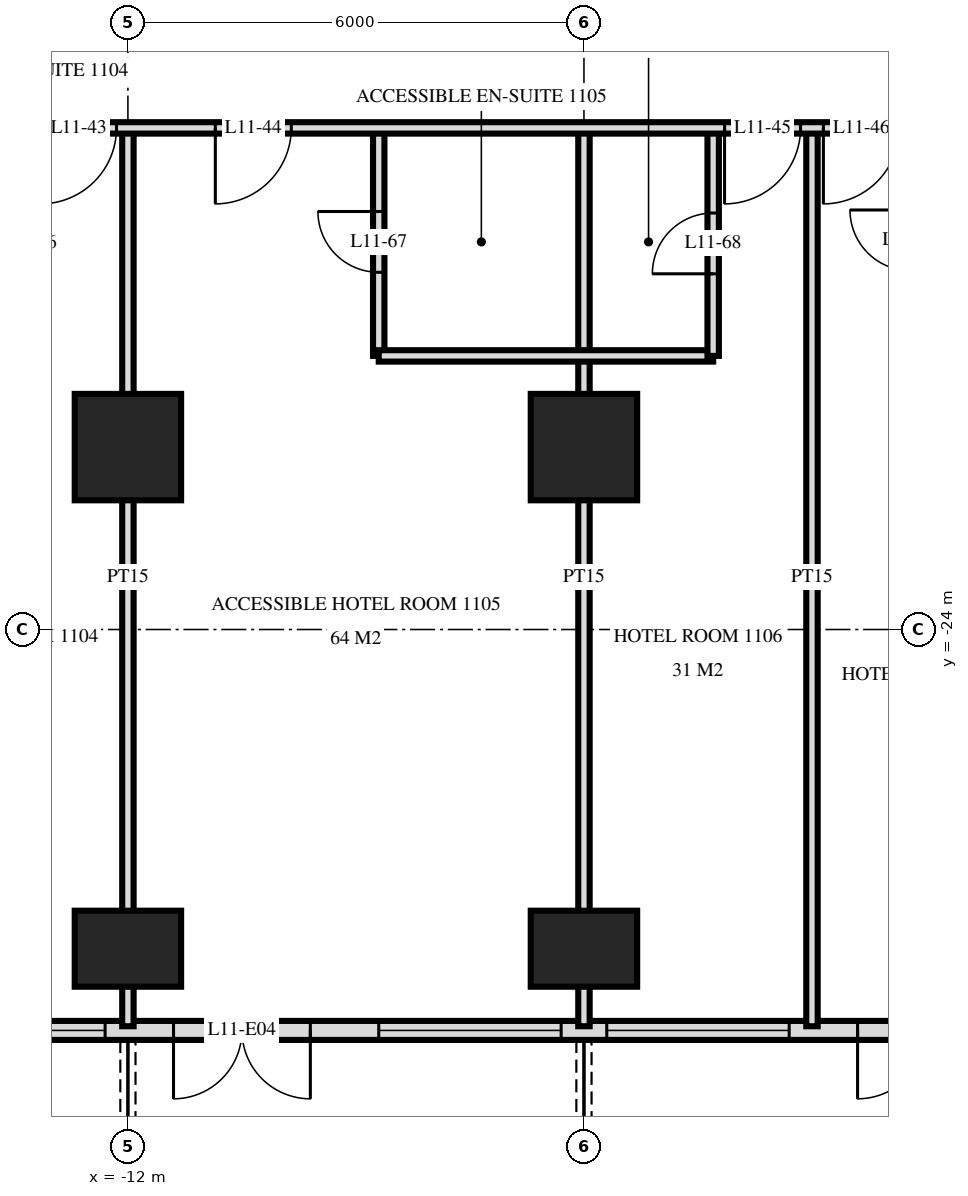
"""IFC4 building model, lengths in metres.
Left out: names, types, materials, properties, quantities, classifications, styles, units other than length and angle.
Written with IfcOpenShell. Run it as: python <this file> out.ifc"""

import sys

from ifc_helpers import new_model, si_unit, direction, frame, frame_2d, origin, origin_2d, place, context, subcontext, project, spatial, rectangle, extrude, element, fill, save


model = new_model("IFC4")
c1 = context("Model", 3, precision=1e-05, world=origin(), true_north=direction((0.0, 1.0)))
c2 = subcontext(c1, "Body", "Model", "MODEL_VIEW")
j1 = project(units=[si_unit("LENGTHUNIT", "METRE"), si_unit("PLANEANGLEUNIT", "RADIAN")], contexts=[c1])
p1 = place(None, origin())
s1 = spatial("IfcSite", under=j1, at=p1, CompositionType="ELEMENT")
p2 = place(p1, origin())
s2 = spatial("IfcBuilding", under=s1, at=p2, CompositionType="ELEMENT")
p3 = place(p2, frame((0.0, 0.0, 49.2)))
s3 = spatial("IfcBuildingStorey", under=s2, at=p3, CompositionType="ELEMENT", Elevation=49.2)
p4 = place(p3, frame((-12.0, -28.2, 0.0), z_axis=(0.0, 0.0, 1.0), x_axis=(1.0, 0.0, 0.0)))
e1 = element("IfcColumn", 1, at=p4, inside=s3, PredefinedType="COLUMN", context=c2, shape_type="SweptSolid", body=[
    extrude(rectangle(XDim=1.4, YDim=1.0, at=origin_2d()), origin(), (0.0, 0.0, 1.0), 3.6),
])
p5 = place(p3, frame((-12.0, -21.6, 0.0), z_axis=(0.0, 0.0, 1.0), x_axis=(1.0, 0.0, 0.0)))
e2 = element("IfcColumn", 2, at=p5, inside=s3, PredefinedType="COLUMN", context=c2, shape_type="SweptSolid", body=[
    extrude(rectangle(XDim=1.4, YDim=1.4, at=origin_2d()), origin(), (0.0, 0.0, 1.0), 3.6),
])
p6 = place(p3, frame((-6.0, -28.2, 0.0), z_axis=(0.0, 0.0, 1.0), x_axis=(1.0, 0.0, 0.0)))
e3 = element("IfcColumn", 3, at=p6, inside=s3, PredefinedType="COLUMN", context=c2, shape_type="SweptSolid", body=[
    extrude(rectangle(XDim=1.4, YDim=1.0, at=origin_2d()), origin(), (0.0, 0.0, 1.0), 3.6),
])
p7 = place(p3, frame((-6.0, -21.6, 0.0), z_axis=(0.0, 0.0, 1.0), x_axis=(1.0, 0.0, 0.0)))
e4 = element("IfcColumn", 4, at=p7, inside=s3, PredefinedType="COLUMN", context=c2, shape_type="SweptSolid", body=[
    extrude(rectangle(XDim=1.4, YDim=1.4, at=origin_2d()), origin(), (0.0, 0.0, 1.0), 3.6),
])
p8 = place(p3, frame((-28.775, -29.275, 0.0), z_axis=(0.0, 0.0, 1.0), x_axis=(1.0, 0.0, 0.0)))
e5 = element("IfcWall", 5, at=p8, inside=s3, PredefinedType="SOLIDWALL", context=c2, shape_type="SweptSolid", body=[
    extrude(rectangle(XDim=57.551, YDim=0.25, at=frame_2d((28.775, 0.0))), origin(), (0.0, 0.0, 1.0), 3.32),
])
p9 = place(p8, frame((0.575, 0.0, 0.0)))
e6 = element("IfcOpeningElement", 6, at=p9, cuts=e5, PredefinedType="OPENING", context=c2, shape_type="SweptSolid", body=[
    extrude(rectangle(XDim=1.8, YDim=2.4, at=frame_2d((0.9, 1.2))), frame((0.0, 0.135, 0.0), z_axis=(0.0, -1.0, 0.0), x_axis=(1.0, 0.0, 0.0)), (0.0, 0.0, 1.0), 0.27),
])
p10 = place(p8, frame((5.375, 0.0, 0.0)))
e7 = element("IfcOpeningElement", 7, at=p10, cuts=e5, PredefinedType="OPENING", context=c2, shape_type="SweptSolid", body=[
    extrude(rectangle(XDim=1.8, YDim=2.4, at=frame_2d((0.9, 1.2))), frame((0.0, 0.135, 0.0), z_axis=(0.0, -1.0, 0.0), x_axis=(1.0, 0.0, 0.0)), (0.0, 0.0, 1.0), 0.27),
])
p11 = place(p8, frame((8.075, 0.0, 0.3)))
e8 = element("IfcOpeningElement", 8, at=p11, cuts=e5, PredefinedType="OPENING", context=c2, shape_type="SweptSolid", body=[
    extrude(rectangle(XDim=2.4, YDim=2.1, at=frame_2d((1.2, 1.05))), frame((0.0, 0.135, 0.0), z_axis=(0.0, -1.0, 0.0), x_axis=(1.0, 0.0, 0.0)), (0.0, 0.0, 1.0), 0.27),
])
p12 = place(p8, frame((11.375, 0.0, 0.0)))
e9 = element("IfcOpeningElement", 9, at=p12, cuts=e5, PredefinedType="OPENING", context=c2, shape_type="SweptSolid", body=[
    extrude(rectangle(XDim=1.8, YDim=2.4, at=frame_2d((0.9, 1.2))), frame((0.0, 0.135, 0.0), z_axis=(0.0, -1.0, 0.0), x_axis=(1.0, 0.0, 0.0)), (0.0, 0.0, 1.0), 0.27),
])
p13 = place(p8, frame((14.075, 0.0, 0.3)))
e10 = element("IfcOpeningElement", 10, at=p13, cuts=e5, PredefinedType="OPENING", context=c2, shape_type="SweptSolid", body=[
    extrude(rectangle(XDim=2.4, YDim=2.1, at=frame_2d((1.2, 1.05))), frame((0.0, 0.135, 0.0), z_axis=(0.0, -1.0, 0.0), x_axis=(1.0, 0.0, 0.0)), (0.0, 0.0, 1.0), 0.27),
])
p14 = place(p8, frame((17.375, 0.0, 0.0)))
e11 = element("IfcOpeningElement", 11, at=p14, cuts=e5, PredefinedType="OPENING", context=c2, shape_type="SweptSolid", body=[
    extrude(rectangle(XDim=1.8, YDim=2.4, at=frame_2d((0.9, 1.2))), frame((0.0, 0.135, 0.0), z_axis=(0.0, -1.0, 0.0), x_axis=(1.0, 0.0, 0.0)), (0.0, 0.0, 1.0), 0.27),
])
p15 = place(p8, frame((20.075, 0.0, 0.3)))
e12 = element("IfcOpeningElement", 12, at=p15, cuts=e5, PredefinedType="OPENING", context=c2, shape_type="SweptSolid", body=[
    extrude(rectangle(XDim=2.4, YDim=2.1, at=frame_2d((1.2, 1.05))), frame((0.0, 0.135, 0.0), z_axis=(0.0, -1.0, 0.0), x_axis=(1.0, 0.0, 0.0)), (0.0, 0.0, 1.0), 0.27),
])
p16 = place(p8, frame((23.075, 0.0, 0.3)))
e13 = element("IfcOpeningElement", 13, at=p16, cuts=e5, PredefinedType="OPENING", context=c2, shape_type="SweptSolid", body=[
    extrude(rectangle(XDim=2.4, YDim=2.1, at=frame_2d((1.2, 1.05))), frame((0.0, 0.135, 0.0), z_axis=(0.0, -1.0, 0.0), x_axis=(1.0, 0.0, 0.0)), (0.0, 0.0, 1.0), 0.27),
])
p17 = place(p8, frame((26.375, 0.0, 0.0)))
e14 = element("IfcOpeningElement", 14, at=p17, cuts=e5, PredefinedType="OPENING", context=c2, shape_type="SweptSolid", body=[
    extrude(rectangle(XDim=1.8, YDim=2.4, at=frame_2d((0.9, 1.2))), frame((0.0, 0.135, 0.0), z_axis=(0.0, -1.0, 0.0), x_axis=(1.0, 0.0, 0.0)), (0.0, 0.0, 1.0), 0.27),
])
p18 = place(p8, frame((29.375, 0.0, 0.0)))
e15 = element("IfcOpeningElement", 15, at=p18, cuts=e5, PredefinedType="OPENING", context=c2, shape_type="SweptSolid", body=[
    extrude(rectangle(XDim=1.8, YDim=2.4, at=frame_2d((0.9, 1.2))), frame((0.0, 0.135, 0.0), z_axis=(0.0, -1.0, 0.0), x_axis=(1.0, 0.0, 0.0)), (0.0, 0.0, 1.0), 0.27),
])
p19 = place(p8, frame((32.075, 0.0, 0.3)))
e16 = element("IfcOpeningElement", 16, at=p19, cuts=e5, PredefinedType="OPENING", context=c2, shape_type="SweptSolid", body=[
    extrude(rectangle(XDim=2.4, YDim=2.1, at=frame_2d((1.2, 1.05))), frame((0.0, 0.135, 0.0), z_axis=(0.0, -1.0, 0.0), x_axis=(1.0, 0.0, 0.0)), (0.0, 0.0, 1.0), 0.27),
])
p20 = place(p8, frame((35.075, 0.0, 0.3)))
e17 = element("IfcOpeningElement", 17, at=p20, cuts=e5, PredefinedType="OPENING", context=c2, shape_type="SweptSolid", body=[
    extrude(rectangle(XDim=2.4, YDim=2.1, at=frame_2d((1.2, 1.05))), frame((0.0, 0.135, 0.0), z_axis=(0.0, -1.0, 0.0), x_axis=(1.0, 0.0, 0.0)), (0.0, 0.0, 1.0), 0.27),
])
p21 = place(p8, frame((38.375, 0.0, 0.0)))
e18 = element("IfcOpeningElement", 18, at=p21, cuts=e5, PredefinedType="OPENING", context=c2, shape_type="SweptSolid", body=[
    extrude(rectangle(XDim=1.8, YDim=2.4, at=frame_2d((0.9, 1.2))), frame((0.0, 0.135, 0.0), z_axis=(0.0, -1.0, 0.0), x_axis=(1.0, 0.0, 0.0)), (0.0, 0.0, 1.0), 0.27),
])
p22 = place(p8, frame((41.375, 0.0, 0.0)))
e19 = element("IfcOpeningElement", 19, at=p22, cuts=e5, PredefinedType="OPENING", context=c2, shape_type="SweptSolid", body=[
    extrude(rectangle(XDim=1.8, YDim=2.4, at=frame_2d((0.9, 1.2))), frame((0.0, 0.135, 0.0), z_axis=(0.0, -1.0, 0.0), x_axis=(1.0, 0.0, 0.0)), (0.0, 0.0, 1.0), 0.27),
])
p23 = place(p8, frame((44.075, 0.0, 0.3)))
e20 = element("IfcOpeningElement", 20, at=p23, cuts=e5, PredefinedType="OPENING", context=c2, shape_type="SweptSolid", body=[
    extrude(rectangle(XDim=2.4, YDim=2.1, at=frame_2d((1.2, 1.05))), frame((0.0, 0.135, 0.0), z_axis=(0.0, -1.0, 0.0), x_axis=(1.0, 0.0, 0.0)), (0.0, 0.0, 1.0), 0.27),
])
p24 = place(p8, frame((47.075, 0.0, 0.3)))
e21 = element("IfcOpeningElement", 21, at=p24, cuts=e5, PredefinedType="OPENING", context=c2, shape_type="SweptSolid", body=[
    extrude(rectangle(XDim=2.4, YDim=2.1, at=frame_2d((1.2, 1.05))), frame((0.0, 0.135, 0.0), z_axis=(0.0, -1.0, 0.0), x_axis=(1.0, 0.0, 0.0)), (0.0, 0.0, 1.0), 0.27),
])
p25 = place(p8, frame((50.375, 0.0, 0.0)))
e22 = element("IfcOpeningElement", 22, at=p25, cuts=e5, PredefinedType="OPENING", context=c2, shape_type="SweptSolid", body=[
    extrude(rectangle(XDim=1.8, YDim=2.4, at=frame_2d((0.9, 1.2))), frame((0.0, 0.135, 0.0), z_axis=(0.0, -1.0, 0.0), x_axis=(1.0, 0.0, 0.0)), (0.0, 0.0, 1.0), 0.27),
])
p26 = place(p8, frame((53.375, 0.0, 0.0)))
e23 = element("IfcOpeningElement", 23, at=p26, cuts=e5, PredefinedType="OPENING", context=c2, shape_type="SweptSolid", body=[
    extrude(rectangle(XDim=1.8, YDim=2.4, at=frame_2d((0.9, 1.2))), frame((0.0, 0.135, 0.0), z_axis=(0.0, -1.0, 0.0), x_axis=(1.0, 0.0, 0.0)), (0.0, 0.0, 1.0), 0.27),
])
p27 = place(p3, frame((-3.0, -29.22, 0.0), z_axis=(0.0, 0.0, 1.0), x_axis=(0.0, 1.0, 0.0)))
e24 = element("IfcWall", 24, at=p27, inside=s3, PredefinedType="PARTITIONING", context=c2, shape_type="SweptSolid", body=[
    extrude(rectangle(XDim=11.82, YDim=0.15, at=frame_2d((5.91, 0.0))), origin(), (0.0, 0.0, 1.0), 3.32),
])
p28 = place(p3, frame((-4.3, -20.4, 0.0), z_axis=(0.0, 0.0, 1.0), x_axis=(0.0, 1.0, 0.0)))
e25 = element("IfcWall", 25, at=p28, inside=s3, PredefinedType="PARTITIONING", context=c2, shape_type="SweptSolid", body=[
    extrude(rectangle(XDim=3.0, YDim=0.15, at=frame_2d((1.5, 0.0))), origin(), (0.0, 0.0, 1.0), 3.32),
])
p29 = place(p28, frame((1.08, 0.0, 0.0)))
e26 = element("IfcOpeningElement", 26, at=p29, cuts=e25, PredefinedType="OPENING", context=c2, shape_type="SweptSolid", body=[
    extrude(rectangle(XDim=0.8, YDim=2.1, at=frame_2d((0.4, 1.05))), frame((0.0, 0.085, 0.0), z_axis=(0.0, -1.0, 0.0), x_axis=(1.0, 0.0, 0.0)), (0.0, 0.0, 1.0), 0.17),
])
p30 = place(p3, frame((-6.0, -29.22, 0.0), z_axis=(0.0, 0.0, 1.0), x_axis=(0.0, 1.0, 0.0)))
e27 = element("IfcWall", 27, at=p30, inside=s3, PredefinedType="PARTITIONING", context=c2, shape_type="SweptSolid", body=[
    extrude(rectangle(XDim=11.82, YDim=0.15, at=frame_2d((5.91, 0.0))), origin(), (0.0, 0.0, 1.0), 3.32),
])
p31 = place(p3, frame((-8.7, -20.4, 0.0), z_axis=(0.0, 0.0, 1.0), x_axis=(0.0, 1.0, 0.0)))
e28 = element("IfcWall", 28, at=p31, inside=s3, PredefinedType="PARTITIONING", context=c2, shape_type="SweptSolid", body=[
    extrude(rectangle(XDim=3.0, YDim=0.15, at=frame_2d((1.5, 0.0))), origin(), (0.0, 0.0, 1.0), 3.32),
])
p32 = place(p31, frame((1.1, 0.0, 0.0)))
e29 = element("IfcOpeningElement", 29, at=p32, cuts=e28, PredefinedType="OPENING", context=c2, shape_type="SweptSolid", body=[
    extrude(rectangle(XDim=0.8, YDim=2.1, at=frame_2d((0.4, 1.05))), frame((0.0, 0.085, 0.0), z_axis=(0.0, -1.0, 0.0), x_axis=(1.0, 0.0, 0.0)), (0.0, 0.0, 1.0), 0.17),
])
p33 = place(p3, frame((-12.0, -29.22, 0.0), z_axis=(0.0, 0.0, 1.0), x_axis=(0.0, 1.0, 0.0)))
e30 = element("IfcWall", 30, at=p33, inside=s3, PredefinedType="PARTITIONING", context=c2, shape_type="SweptSolid", body=[
    extrude(rectangle(XDim=11.82, YDim=0.15, at=frame_2d((5.91, 0.0))), origin(), (0.0, 0.0, 1.0), 3.32),
])
p34 = place(p3, frame((-8.7, -20.4, 0.0), z_axis=(0.0, 0.0, 1.0), x_axis=(1.0, 0.0, 0.0)))
e31 = element("IfcWall", 31, at=p34, inside=s3, PredefinedType="PARTITIONING", context=c2, shape_type="SweptSolid", body=[
    extrude(rectangle(XDim=4.4, YDim=0.15, at=frame_2d((2.2, 0.0))), origin(), (0.0, 0.0, 1.0), 3.32),
])
p35 = place(p3, frame((-33.12, -17.4, 0.0), z_axis=(0.0, 0.0, 1.0), x_axis=(1.0, 0.0, 0.0)))
e32 = element("IfcWall", 32, at=p35, inside=s3, PredefinedType="PARTITIONING", context=c2, shape_type="SweptSolid", body=[
    extrude(rectangle(XDim=66.24, YDim=0.15, at=frame_2d((33.12, 0.0))), origin(), (0.0, 0.0, 1.0), 3.32),
])
p36 = place(p35, frame((9.27, 0.0, 0.0)))
e33 = element("IfcOpeningElement", 33, at=p36, cuts=e32, PredefinedType="OPENING", context=c2, shape_type="SweptSolid", body=[
    extrude(rectangle(XDim=1.0, YDim=2.1, at=frame_2d((0.5, 1.05))), frame((0.0, 0.085, 0.0), z_axis=(0.0, -1.0, 0.0), x_axis=(1.0, 0.0, 0.0)), (0.0, 0.0, 1.0), 0.17),
])
p37 = place(p35, frame((13.97, 0.0, 0.0)))
e34 = element("IfcOpeningElement", 34, at=p37, cuts=e32, PredefinedType="OPENING", context=c2, shape_type="SweptSolid", body=[
    extrude(rectangle(XDim=1.0, YDim=2.1, at=frame_2d((0.5, 1.05))), frame((0.0, 0.085, 0.0), z_axis=(0.0, -1.0, 0.0), x_axis=(1.0, 0.0, 0.0)), (0.0, 0.0, 1.0), 0.17),
])
p38 = place(p35, frame((15.27, 0.0, 0.0)))
e35 = element("IfcOpeningElement", 35, at=p38, cuts=e32, PredefinedType="OPENING", context=c2, shape_type="SweptSolid", body=[
    extrude(rectangle(XDim=1.0, YDim=2.1, at=frame_2d((0.5, 1.05))), frame((0.0, 0.085, 0.0), z_axis=(0.0, -1.0, 0.0), x_axis=(1.0, 0.0, 0.0)), (0.0, 0.0, 1.0), 0.17),
])
p39 = place(p35, frame((19.97, 0.0, 0.0)))
e36 = element("IfcOpeningElement", 36, at=p39, cuts=e32, PredefinedType="OPENING", context=c2, shape_type="SweptSolid", body=[
    extrude(rectangle(XDim=1.0, YDim=2.1, at=frame_2d((0.5, 1.05))), frame((0.0, 0.085, 0.0), z_axis=(0.0, -1.0, 0.0), x_axis=(1.0, 0.0, 0.0)), (0.0, 0.0, 1.0), 0.17),
])
p40 = place(p35, frame((22.27, 0.0, 0.0)))
e37 = element("IfcOpeningElement", 37, at=p40, cuts=e32, PredefinedType="OPENING", context=c2, shape_type="SweptSolid", body=[
    extrude(rectangle(XDim=1.0, YDim=2.1, at=frame_2d((0.5, 1.05))), frame((0.0, 0.085, 0.0), z_axis=(0.0, -1.0, 0.0), x_axis=(1.0, 0.0, 0.0)), (0.0, 0.0, 1.0), 0.17),
])
p41 = place(p35, frame((28.97, 0.0, 0.0)))
e38 = element("IfcOpeningElement", 38, at=p41, cuts=e32, PredefinedType="OPENING", context=c2, shape_type="SweptSolid", body=[
    extrude(rectangle(XDim=1.0, YDim=2.1, at=frame_2d((0.5, 1.05))), frame((0.0, 0.085, 0.0), z_axis=(0.0, -1.0, 0.0), x_axis=(1.0, 0.0, 0.0)), (0.0, 0.0, 1.0), 0.17),
])
p42 = place(p35, frame((30.27, 0.0, 0.0)))
e39 = element("IfcOpeningElement", 39, at=p42, cuts=e32, PredefinedType="OPENING", context=c2, shape_type="SweptSolid", body=[
    extrude(rectangle(XDim=1.0, YDim=2.1, at=frame_2d((0.5, 1.05))), frame((0.0, 0.085, 0.0), z_axis=(0.0, -1.0, 0.0), x_axis=(1.0, 0.0, 0.0)), (0.0, 0.0, 1.0), 0.17),
])
p43 = place(p35, frame((34.97, 0.0, 0.0)))
e40 = element("IfcOpeningElement", 40, at=p43, cuts=e32, PredefinedType="OPENING", context=c2, shape_type="SweptSolid", body=[
    extrude(rectangle(XDim=1.0, YDim=2.1, at=frame_2d((0.5, 1.05))), frame((0.0, 0.085, 0.0), z_axis=(0.0, -1.0, 0.0), x_axis=(1.0, 0.0, 0.0)), (0.0, 0.0, 1.0), 0.17),
])
p44 = place(p35, frame((36.27, 0.0, 0.0)))
e41 = element("IfcOpeningElement", 41, at=p44, cuts=e32, PredefinedType="OPENING", context=c2, shape_type="SweptSolid", body=[
    extrude(rectangle(XDim=1.0, YDim=2.1, at=frame_2d((0.5, 1.05))), frame((0.0, 0.085, 0.0), z_axis=(0.0, -1.0, 0.0), x_axis=(1.0, 0.0, 0.0)), (0.0, 0.0, 1.0), 0.17),
])
p45 = place(p35, frame((39.82, 0.0, 0.0)))
e42 = element("IfcOpeningElement", 42, at=p45, cuts=e32, PredefinedType="OPENING", context=c2, shape_type="SweptSolid", body=[
    extrude(rectangle(XDim=1.0, YDim=2.1, at=frame_2d((0.5, 1.05))), frame((0.0, 0.085, 0.0), z_axis=(0.0, -1.0, 0.0), x_axis=(1.0, 0.0, 0.0)), (0.0, 0.0, 1.0), 0.17),
])
p46 = place(p35, frame((51.27, 0.0, 0.0)))
e43 = element("IfcOpeningElement", 43, at=p46, cuts=e32, PredefinedType="OPENING", context=c2, shape_type="SweptSolid", body=[
    extrude(rectangle(XDim=1.0, YDim=2.1, at=frame_2d((0.5, 1.05))), frame((0.0, 0.085, 0.0), z_axis=(0.0, -1.0, 0.0), x_axis=(1.0, 0.0, 0.0)), (0.0, 0.0, 1.0), 0.17),
])
p47 = place(p35, frame((4.42, 0.0, 0.0)))
e44 = element("IfcOpeningElement", 44, at=p47, cuts=e32, PredefinedType="OPENING", context=c2, shape_type="SweptSolid", body=[
    extrude(rectangle(XDim=1.0, YDim=2.1, at=frame_2d((0.5, 1.05))), frame((0.0, 0.085, 0.0), z_axis=(0.0, -1.0, 0.0), x_axis=(1.0, 0.0, 0.0)), (0.0, 0.0, 1.0), 0.17),
])
p48 = place(p35, frame((54.82, 0.0, 0.0)))
e45 = element("IfcOpeningElement", 45, at=p48, cuts=e32, PredefinedType="OPENING", context=c2, shape_type="SweptSolid", body=[
    extrude(rectangle(XDim=1.0, YDim=2.1, at=frame_2d((0.5, 1.05))), frame((0.0, 0.085, 0.0), z_axis=(0.0, -1.0, 0.0), x_axis=(1.0, 0.0, 0.0)), (0.0, 0.0, 1.0), 0.17),
])
p49 = place(p13, origin())
e46 = element("IfcWindow", 46, at=p49, inside=s3, PartitioningType="SINGLE_PANEL", PredefinedType="WINDOW", context=c2, shape_type="SweptSolid", body=[
    extrude(rectangle(XDim=2.4, YDim=2.1, at=frame_2d((1.2, 1.05))), frame((0.0, 0.03, 0.0), z_axis=(0.0, -1.0, 0.0), x_axis=(1.0, 0.0, 0.0)), (0.0, 0.0, 1.0), 0.06),
])
fill(e10, e46)
p50 = place(p14, frame((0.9, 0.0, 0.0), z_axis=(0.0, 0.0, 1.0), x_axis=(-1.0, 0.0, 0.0)))
e47 = element("IfcDoor", 47, at=p50, inside=s3, OperationType="DOUBLE_DOOR_SINGLE_SWING", PredefinedType="DOOR", context=c2, shape_type="SweptSolid", body=[
    extrude(rectangle(XDim=1.8, YDim=2.4, at=frame_2d((0.0, 1.2))), frame((0.0, -0.025, 0.0), z_axis=(0.0, 1.0, 0.0), x_axis=(-1.0, 0.0, 0.0)), (0.0, 0.0, 1.0), 0.05),
])
fill(e11, e47)
p51 = place(p15, origin())
e48 = element("IfcWindow", 48, at=p51, inside=s3, PartitioningType="SINGLE_PANEL", PredefinedType="WINDOW", context=c2, shape_type="SweptSolid", body=[
    extrude(rectangle(XDim=2.4, YDim=2.1, at=frame_2d((1.2, 1.05))), frame((0.0, 0.03, 0.0), z_axis=(0.0, -1.0, 0.0), x_axis=(1.0, 0.0, 0.0)), (0.0, 0.0, 1.0), 0.06),
])
fill(e12, e48)
p52 = place(p16, origin())
e49 = element("IfcWindow", 49, at=p52, inside=s3, PartitioningType="SINGLE_PANEL", PredefinedType="WINDOW", context=c2, shape_type="SweptSolid", body=[
    extrude(rectangle(XDim=2.4, YDim=2.1, at=frame_2d((1.2, 1.05))), frame((0.0, 0.03, 0.0), z_axis=(0.0, -1.0, 0.0), x_axis=(1.0, 0.0, 0.0)), (0.0, 0.0, 1.0), 0.06),
])
fill(e13, e49)
p53 = place(p17, frame((0.9, 0.0, 0.0), z_axis=(0.0, 0.0, 1.0), x_axis=(-1.0, 0.0, 0.0)))
e50 = element("IfcDoor", 50, at=p53, inside=s3, OperationType="DOUBLE_DOOR_SINGLE_SWING", PredefinedType="DOOR", context=c2, shape_type="SweptSolid", body=[
    extrude(rectangle(XDim=1.8, YDim=2.4, at=frame_2d((0.0, 1.2))), frame((0.0, -0.025, 0.0), z_axis=(0.0, 1.0, 0.0), x_axis=(-1.0, 0.0, 0.0)), (0.0, 0.0, 1.0), 0.05),
])
fill(e14, e50)
p54 = place(p39, frame((0.5, 0.0, 0.0), z_axis=(0.0, 0.0, 1.0), x_axis=(-1.0, 0.0, 0.0)))
e51 = element("IfcDoor", 51, at=p54, inside=s3, OperationType="SINGLE_SWING_LEFT", PredefinedType="DOOR", context=c2, shape_type="SweptSolid", body=[
    extrude(rectangle(XDim=1.0, YDim=2.1, at=frame_2d((0.0, 1.05))), frame((0.0, -0.025, 0.0), z_axis=(0.0, 1.0, 0.0), x_axis=(-1.0, 0.0, 0.0)), (0.0, 0.0, 1.0), 0.05),
])
fill(e36, e51)
p55 = place(p40, frame((0.5, 0.0, 0.0), z_axis=(0.0, 0.0, 1.0), x_axis=(-1.0, 0.0, 0.0)))
e52 = element("IfcDoor", 52, at=p55, inside=s3, OperationType="SINGLE_SWING_LEFT", PredefinedType="DOOR", context=c2, shape_type="SweptSolid", body=[
    extrude(rectangle(XDim=1.0, YDim=2.1, at=frame_2d((0.0, 1.05))), frame((0.0, -0.025, 0.0), z_axis=(0.0, 1.0, 0.0), x_axis=(-1.0, 0.0, 0.0)), (0.0, 0.0, 1.0), 0.05),
])
fill(e37, e52)
p56 = place(p41, frame((0.5, 0.0, 0.0), z_axis=(0.0, 0.0, 1.0), x_axis=(-1.0, 0.0, 0.0)))
e53 = element("IfcDoor", 53, at=p56, inside=s3, OperationType="SINGLE_SWING_LEFT", PredefinedType="DOOR", context=c2, shape_type="SweptSolid", body=[
    extrude(rectangle(XDim=1.0, YDim=2.1, at=frame_2d((0.0, 1.05))), frame((0.0, -0.025, 0.0), z_axis=(0.0, 1.0, 0.0), x_axis=(-1.0, 0.0, 0.0)), (0.0, 0.0, 1.0), 0.05),
])
fill(e38, e53)
p57 = place(p42, frame((0.5, 0.0, 0.0), z_axis=(0.0, 0.0, 1.0), x_axis=(-1.0, 0.0, 0.0)))
e54 = element("IfcDoor", 54, at=p57, inside=s3, OperationType="SINGLE_SWING_LEFT", PredefinedType="DOOR", context=c2, shape_type="SweptSolid", body=[
    extrude(rectangle(XDim=1.0, YDim=2.1, at=frame_2d((0.0, 1.05))), frame((0.0, -0.025, 0.0), z_axis=(0.0, 1.0, 0.0), x_axis=(-1.0, 0.0, 0.0)), (0.0, 0.0, 1.0), 0.05),
])
fill(e39, e54)
p58 = place(p32, origin())
e55 = element("IfcDoor", 55, at=p58, inside=s3, OperationType="SINGLE_SWING_LEFT", PredefinedType="DOOR", context=c2, shape_type="SweptSolid", body=[
    extrude(rectangle(XDim=0.8, YDim=2.1, at=frame_2d((0.4, 1.05))), frame((0.0, 0.025, 0.0), z_axis=(0.0, -1.0, 0.0), x_axis=(1.0, 0.0, 0.0)), (0.0, 0.0, 1.0), 0.05),
])
fill(e29, e55)
p59 = place(p29, origin())
e56 = element("IfcDoor", 56, at=p59, inside=s3, OperationType="SINGLE_SWING_RIGHT", PredefinedType="DOOR", context=c2, shape_type="SweptSolid", body=[
    extrude(rectangle(XDim=0.8, YDim=2.1, at=frame_2d((0.4, 1.05))), frame((0.0, 0.025, 0.0), z_axis=(0.0, -1.0, 0.0), x_axis=(1.0, 0.0, 0.0)), (0.0, 0.0, 1.0), 0.05),
])
fill(e26, e56)
save(model, sys.argv[1])
